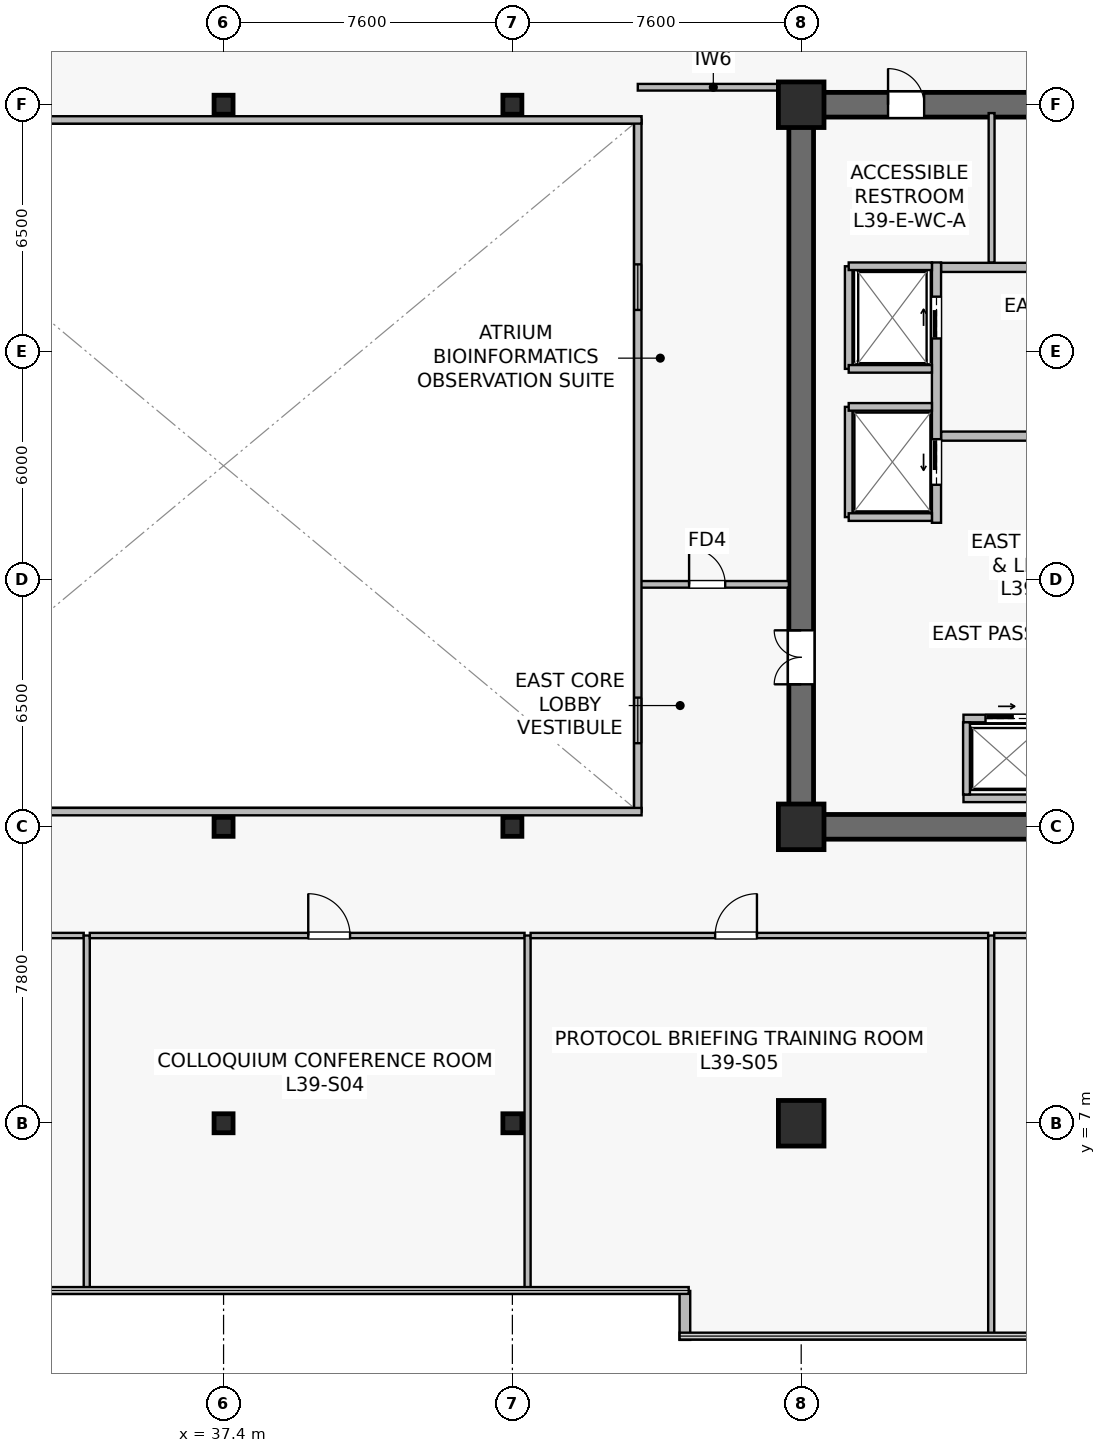
"""IFC4 building model, lengths in metres.
Left out: names, types, materials, properties, quantities, classifications, styles, units other than length and angle.
Written with IfcOpenShell. Run it as: python <this file> out.ifc"""

import sys

from ifc_helpers import new_model, si_unit, direction, frame, frame_2d, origin, origin_2d, place, context, subcontext, project, spatial, rectangle, hollow_rectangle, extrude, source, transform, mapped, element, fill, save


model = new_model("IFC4")
c1 = context("Model", 3, precision=1e-05, world=origin(), true_north=direction((0.0, 1.0)))
c2 = subcontext(c1, "Body", "Model", "MODEL_VIEW")
j1 = project(units=[si_unit("LENGTHUNIT", "METRE"), si_unit("PLANEANGLEUNIT", "RADIAN")], contexts=[c1])
p1 = place(None, origin())
s1 = spatial("IfcSite", under=j1, at=p1, CompositionType="ELEMENT")
p2 = place(p1, origin())
s2 = spatial("IfcBuilding", under=s1, at=p2, CompositionType="ELEMENT")
p3 = place(p2, frame((0.0, 0.0, 162.5)))
s3 = spatial("IfcBuildingStorey", under=s2, at=p3, CompositionType="ELEMENT", Elevation=162.5)
p4 = place(p3, frame((52.275, 14.8, 0.0), z_axis=(0.0, 0.0, 1.0), x_axis=(1.0, 0.0, 0.0)))
e1 = element("IfcWall", 1, at=p4, inside=s3, PredefinedType="SHEAR", context=c2, shape_type="SweptSolid", body=[
    extrude(rectangle(XDim=15.45, YDim=0.65, at=frame_2d((7.725, 0.0))), origin(), (0.0, 0.0, 1.0), 3.79),
])
p5 = place(p3, frame((52.275, 33.8, 0.0), z_axis=(0.0, 0.0, 1.0), x_axis=(1.0, 0.0, 0.0)))
e2 = element("IfcWall", 2, at=p5, inside=s3, PredefinedType="SHEAR", context=c2, shape_type="SweptSolid", body=[
    extrude(rectangle(XDim=15.45, YDim=0.65, at=frame_2d((7.725, 0.0))), origin(), (0.0, 0.0, 1.0), 3.79),
])
p6 = place(p5, frame((7.675, 0.0, 0.0)))
e3 = element("IfcOpeningElement", 3, at=p6, cuts=e2, PredefinedType="OPENING", context=c2, shape_type="SweptSolid", body=[
    extrude(rectangle(XDim=0.95, YDim=2.15, at=frame_2d((0.475, 1.075))), frame((0.0, 0.335, 0.0), z_axis=(0.0, -1.0, 0.0), x_axis=(1.0, 0.0, 0.0)), (0.0, 0.0, 1.0), 0.67),
])
p7 = place(p5, frame((2.61, 0.0, 0.0)))
e4 = element("IfcOpeningElement", 4, at=p7, cuts=e2, PredefinedType="OPENING", context=c2, shape_type="SweptSolid", body=[
    extrude(rectangle(XDim=0.95, YDim=2.15, at=frame_2d((0.475, 1.075))), frame((0.0, 0.335, 0.0), z_axis=(0.0, -1.0, 0.0), x_axis=(1.0, 0.0, 0.0)), (0.0, 0.0, 1.0), 0.67),
])
p8 = place(p3, frame((52.6, 15.125, 0.0), z_axis=(0.0, 0.0, 1.0), x_axis=(0.0, 1.0, 0.0)))
e5 = element("IfcWall", 5, at=p8, inside=s3, PredefinedType="SHEAR", context=c2, shape_type="SweptSolid", body=[
    extrude(rectangle(XDim=18.35, YDim=0.65, at=frame_2d((9.175, 0.0))), origin(), (0.0, 0.0, 1.0), 3.79),
])
p9 = place(p8, frame((3.425, 0.0, 0.0)))
e6 = element("IfcOpeningElement", 6, at=p9, cuts=e5, PredefinedType="OPENING", context=c2, shape_type="SweptSolid", body=[
    extrude(rectangle(XDim=1.42, YDim=2.2, at=frame_2d((0.71, 1.1))), frame((0.0, 0.335, 0.0), z_axis=(0.0, -1.0, 0.0), x_axis=(1.0, 0.0, 0.0)), (0.0, 0.0, 1.0), 0.67),
])
m1 = source(origin(), c2, "Body", "SweptSolid", [
    extrude(rectangle(XDim=1.2, YDim=1.2, at=origin_2d()), origin(), (0.0, 0.0, 1.0), 4.1),
])
for number, where, z_axis, x_axis in (
    (7, (52.6, 7.0, 0.0), (0.0, 0.0, 1.0), (1.0, 0.0, 0.0)),
    (8, (52.6, 14.8, 0.0), (0.0, 0.0, 1.0), (1.0, 0.0, 0.0)),
    (9, (52.6, 33.8, 0.0), (0.0, 0.0, 1.0), (1.0, 0.0, 0.0)),
):
    element("IfcColumn", number, at=place(p3, frame(where, z_axis=z_axis, x_axis=x_axis)), inside=s3, PredefinedType="COLUMN", context=c2, shape_type="MappedRepresentation", body=[
        mapped(m1, transform((0.0, 0.0, 0.0), scale=1.0)),
    ])
m2 = source(origin(), c2, "Body", "SweptSolid", [
    extrude(hollow_rectangle(XDim=0.5, YDim=0.5, WallThickness=0.022, at=origin_2d()), origin(), (0.0, 0.0, 1.0), 4.1),
])
for number, where, z_axis, x_axis in (
    (10, (37.4, 7.0, 0.0), (0.0, 0.0, 1.0), (1.0, 0.0, 0.0)),
    (11, (37.4, 14.8, 0.0), (0.0, 0.0, 1.0), (1.0, 0.0, 0.0)),
    (12, (37.4, 33.8, 0.0), (0.0, 0.0, 1.0), (1.0, 0.0, 0.0)),
    (13, (45.0, 7.0, 0.0), (0.0, 0.0, 1.0), (1.0, 0.0, 0.0)),
    (14, (45.0, 14.8, 0.0), (0.0, 0.0, 1.0), (1.0, 0.0, 0.0)),
    (15, (45.0, 33.8, 0.0), (0.0, 0.0, 1.0), (1.0, 0.0, 0.0)),
):
    element("IfcColumn", number, at=place(p3, frame(where, z_axis=z_axis, x_axis=x_axis)), inside=s3, PredefinedType="COLUMN", context=c2, shape_type="MappedRepresentation", body=[
        mapped(m2, transform((0.0, 0.0, 0.0), scale=1.0)),
    ])
p10 = place(p3, frame((49.54, 2.588, 0.0), z_axis=(0.0, 0.0, 1.0), x_axis=(0.0, -1.0, 0.0)))
e16 = element("IfcWall", 16, at=p10, inside=s3, PredefinedType="STANDARD", context=c2, shape_type="SweptSolid", body=[
    extrude(rectangle(XDim=1.288, YDim=0.28, at=frame_2d((0.644, 0.0))), origin(), (0.0, 0.0, 1.0), 3.79),
])
p11 = place(p3, frame((56.28, 25.08, 0.0), z_axis=(0.0, 0.0, 1.0), x_axis=(1.0, 0.0, 0.0)))
e17 = element("IfcWall", 17, at=p11, inside=s3, PredefinedType="SOLIDWALL", context=c2, shape_type="SweptSolid", body=[
    extrude(rectangle(XDim=6.92, YDim=0.24, at=frame_2d((3.46, 0.0))), origin(), (0.0, 0.0, 1.0), 3.187),
])
p12 = place(p11, frame((2.6, 0.0, 0.0)))
e18 = element("IfcOpeningElement", 18, at=p12, cuts=e17, PredefinedType="OPENING", context=c2, shape_type="SweptSolid", body=[
    extrude(rectangle(XDim=1.2, YDim=2.16, at=frame_2d((0.6, 1.08))), frame((0.0, 0.13, 0.0), z_axis=(0.0, -1.0, 0.0), x_axis=(1.0, 0.0, 0.0)), (0.0, 0.0, 1.0), 0.26),
])
p13 = place(p3, frame((56.28, 29.52, 0.0), z_axis=(0.0, 0.0, 1.0), x_axis=(1.0, 0.0, 0.0)))
e19 = element("IfcWall", 19, at=p13, inside=s3, PredefinedType="SOLIDWALL", context=c2, shape_type="SweptSolid", body=[
    extrude(rectangle(XDim=6.92, YDim=0.24, at=frame_2d((3.46, 0.0))), origin(), (0.0, 0.0, 1.0), 3.187),
])
p14 = place(p3, frame((56.16, 22.8, 0.0), z_axis=(0.0, 0.0, 1.0), x_axis=(0.0, 1.0, 0.0)))
e20 = element("IfcWall", 20, at=p14, inside=s3, PredefinedType="SOLIDWALL", context=c2, shape_type="SweptSolid", body=[
    extrude(rectangle(XDim=6.85, YDim=0.24, at=frame_2d((3.425, 0.0))), origin(), (0.0, 0.0, 1.0), 2.925),
])
p15 = place(p14, frame((4.85, 0.0, 0.0)))
e21 = element("IfcOpeningElement", 21, at=p15, cuts=e20, PredefinedType="OPENING", context=c2, shape_type="SweptSolid", body=[
    extrude(rectangle(XDim=1.1, YDim=2.22, at=frame_2d((0.55, 1.11))), frame((0.0, 0.13, 0.0), z_axis=(0.0, -1.0, 0.0), x_axis=(1.0, 0.0, 0.0)), (0.0, 0.0, 1.0), 0.26),
])
p16 = place(p14, frame((1.0, 0.0, 0.0)))
e22 = element("IfcOpeningElement", 22, at=p16, cuts=e20, PredefinedType="OPENING", context=c2, shape_type="SweptSolid", body=[
    extrude(rectangle(XDim=1.2, YDim=2.22, at=frame_2d((0.6, 1.11))), frame((0.0, 0.13, 0.0), z_axis=(0.0, -1.0, 0.0), x_axis=(1.0, 0.0, 0.0)), (0.0, 0.0, 1.0), 0.26),
])
p17 = place(p3, frame((56.87, 17.65, 0.0), z_axis=(0.0, 0.0, 1.0), x_axis=(1.0, 0.0, 0.0)))
e23 = element("IfcWall", 23, at=p17, inside=s3, PredefinedType="SOLIDWALL", context=c2, shape_type="SweptSolid", body=[
    extrude(rectangle(XDim=2.26, YDim=0.2, at=frame_2d((1.13, 0.0))), origin(), (0.0, 0.0, 1.0), 3.79),
])
p18 = place(p17, frame((0.58, 0.0, 0.0)))
e24 = element("IfcOpeningElement", 24, at=p18, cuts=e23, PredefinedType="OPENING", context=c2, shape_type="SweptSolid", body=[
    extrude(rectangle(XDim=1.1, YDim=2.22, at=frame_2d((0.55, 1.11))), frame((0.0, 0.11, 0.0), z_axis=(0.0, -1.0, 0.0), x_axis=(1.0, 0.0, 0.0)), (0.0, 0.0, 1.0), 0.22),
])
p19 = place(p3, frame((56.87, 15.55, 0.0), z_axis=(0.0, 0.0, 1.0), x_axis=(1.0, 0.0, 0.0)))
e25 = element("IfcWall", 25, at=p19, inside=s3, PredefinedType="SOLIDWALL", context=c2, shape_type="SweptSolid", body=[
    extrude(rectangle(XDim=2.26, YDim=0.2, at=frame_2d((1.13, 0.0))), origin(), (0.0, 0.0, 1.0), 3.79),
])
p20 = place(p3, frame((56.95, 15.65, 0.0), z_axis=(0.0, 0.0, 1.0), x_axis=(0.0, 1.0, 0.0)))
e26 = element("IfcWall", 26, at=p20, inside=s3, PredefinedType="SOLIDWALL", context=c2, shape_type="SweptSolid", body=[
    extrude(rectangle(XDim=1.9, YDim=0.18, at=frame_2d((0.95, 0.0))), origin(), (0.0, 0.0, 1.0), 3.79),
])
p21 = place(p3, frame((53.85, 26.85, 0.0), z_axis=(0.0, 0.0, 1.0), x_axis=(0.0, 1.0, 0.0)))
e27 = element("IfcWall", 27, at=p21, inside=s3, PredefinedType="SOLIDWALL", context=c2, shape_type="SweptSolid", body=[
    extrude(rectangle(XDim=2.7, YDim=0.2, at=frame_2d((1.35, 0.0))), origin(), (0.0, 0.0, 1.0), 3.79),
])
p22 = place(p3, frame((53.85, 29.55, 0.0), z_axis=(0.0, 0.0, 1.0), x_axis=(1.0, 0.0, 0.0)))
e28 = element("IfcWall", 28, at=p22, inside=s3, PredefinedType="SOLIDWALL", context=c2, shape_type="SweptSolid", body=[
    extrude(rectangle(XDim=2.19, YDim=0.2, at=frame_2d((1.095, 0.0))), origin(), (0.0, 0.0, 1.0), 3.79),
])
p23 = place(p3, frame((53.85, 26.85, 0.0), z_axis=(0.0, 0.0, 1.0), x_axis=(1.0, 0.0, 0.0)))
e29 = element("IfcWall", 29, at=p23, inside=s3, PredefinedType="SOLIDWALL", context=c2, shape_type="SweptSolid", body=[
    extrude(rectangle(XDim=2.19, YDim=0.2, at=frame_2d((1.095, 0.0))), origin(), (0.0, 0.0, 1.0), 3.187),
])
p24 = place(p3, frame((53.85, 22.95, 0.0), z_axis=(0.0, 0.0, 1.0), x_axis=(0.0, 1.0, 0.0)))
e30 = element("IfcWall", 30, at=p24, inside=s3, PredefinedType="SOLIDWALL", context=c2, shape_type="SweptSolid", body=[
    extrude(rectangle(XDim=2.9, YDim=0.2, at=frame_2d((1.45, 0.0))), origin(), (0.0, 0.0, 1.0), 2.925),
])
for number, where, z_axis, x_axis in (
    (31, (53.85, 25.85, 0.0), (0.0, 0.0, 1.0), (1.0, 0.0, 0.0)),
    (32, (53.85, 22.95, 0.0), (0.0, 0.0, 1.0), (1.0, 0.0, 0.0)),
):
    element("IfcWall", number, at=place(p3, frame(where, z_axis=z_axis, x_axis=x_axis)), inside=s3, PredefinedType="SOLIDWALL", context=c2, shape_type="SweptSolid", body=[
        extrude(rectangle(XDim=2.19, YDim=0.2, at=frame_2d((1.095, 0.0))), origin(), (0.0, 0.0, 1.0), 3.79),
    ])
p25 = place(p3, frame((57.61, 29.65, 0.0), z_axis=(0.0, 0.0, 1.0), x_axis=(0.0, 1.0, 0.0)))
e33 = element("IfcWall", 33, at=p25, inside=s3, PredefinedType="PLUMBINGWALL", context=c2, shape_type="SweptSolid", body=[
    extrude(rectangle(XDim=3.93, YDim=0.155, at=frame_2d((1.965, 0.0))), origin(), (0.0, 0.0, 1.0), 3.79),
])
p26 = place(p3, frame((48.3, 34.26, 0.0), z_axis=(0.0, 0.0, 1.0), x_axis=(1.0, 0.0, 0.0)))
e34 = element("IfcWall", 34, at=p26, inside=s3, PredefinedType="PARTITIONING", context=c2, shape_type="SweptSolid", body=[
    extrude(rectangle(XDim=3.975, YDim=0.175, at=frame_2d((1.987, 0.0))), origin(), (0.0, 0.0, 1.0), 3.475),
])
p27 = place(p3, frame((48.3, 21.18, 0.0), z_axis=(0.0, 0.0, 1.0), x_axis=(1.0, 0.0, 0.0)))
e35 = element("IfcWall", 35, at=p27, inside=s3, PredefinedType="PARTITIONING", context=c2, shape_type="SweptSolid", body=[
    extrude(rectangle(XDim=3.975, YDim=0.175, at=frame_2d((1.987, 0.0))), origin(), (0.0, 0.0, 1.0), 3.79),
])
p28 = place(p27, frame((1.35, 0.0, 0.0)))
e36 = element("IfcOpeningElement", 36, at=p28, cuts=e35, PredefinedType="OPENING", context=c2, shape_type="SweptSolid", body=[
    extrude(rectangle(XDim=0.95, YDim=2.15, at=frame_2d((0.475, 1.075))), frame((0.0, 0.098, 0.0), z_axis=(0.0, -1.0, 0.0), x_axis=(1.0, 0.0, 0.0)), (0.0, 0.0, 1.0), 0.195),
])
p29 = place(p3, frame((48.3, 15.2, 0.0), z_axis=(0.0, 0.0, 1.0), x_axis=(0.0, 1.0, 0.0)))
e37 = element("IfcWall", 37, at=p29, inside=s3, PredefinedType="SOLIDWALL", context=c2, shape_type="SweptSolid", body=[
    extrude(rectangle(XDim=18.2, YDim=0.195, at=frame_2d((9.1, 0.0))), origin(), (0.0, 0.0, 1.0), 3.79),
])
p30 = place(p29, frame((1.8, 0.0, 0.9)))
e38 = element("IfcOpeningElement", 38, at=p30, cuts=e37, PredefinedType="OPENING", context=c2, shape_type="SweptSolid", body=[
    extrude(rectangle(XDim=1.2, YDim=1.35, at=frame_2d((0.6, 0.675))), frame((0.0, 0.107, 0.0), z_axis=(0.0, -1.0, 0.0), x_axis=(1.0, 0.0, 0.0)), (0.0, 0.0, 1.0), 0.215),
])
p31 = place(p29, frame((13.2, 0.0, 0.9)))
e39 = element("IfcOpeningElement", 39, at=p31, cuts=e37, PredefinedType="OPENING", context=c2, shape_type="SweptSolid", body=[
    extrude(rectangle(XDim=1.2, YDim=1.35, at=frame_2d((0.6, 0.675))), frame((0.0, 0.107, 0.0), z_axis=(0.0, -1.0, 0.0), x_axis=(1.0, 0.0, 0.0)), (0.0, 0.0, 1.0), 0.215),
])
for number, where, z_axis, x_axis in (
    (40, (26.4, 15.2, 0.0), (0.0, 0.0, 1.0), (1.0, 0.0, 0.0)),
    (41, (26.4, 33.4, 0.0), (0.0, 0.0, 1.0), (1.0, 0.0, 0.0)),
):
    element("IfcWall", number, at=place(p3, frame(where, z_axis=z_axis, x_axis=x_axis)), inside=s3, PredefinedType="SOLIDWALL", context=c2, shape_type="SweptSolid", body=[
        extrude(rectangle(XDim=22.0, YDim=0.195, at=frame_2d((11.0, 0.0))), origin(), (0.0, 0.0, 1.0), 3.79),
    ])
p32 = place(p3, frame((22.88, 11.94, 0.0), z_axis=(0.0, 0.0, 1.0), x_axis=(1.0, 0.0, 0.0)))
e42 = element("IfcWall", 42, at=p32, inside=s3, PredefinedType="PARTITIONING", context=c2, shape_type="SweptSolid", body=[
    extrude(rectangle(XDim=10.84, YDim=0.14, at=frame_2d((5.42, 0.0))), origin(), (0.0, 0.0, 1.0), 3.187),
])
p33 = place(p32, frame((4.328, 0.0, 0.0)))
e43 = element("IfcOpeningElement", 43, at=p33, cuts=e42, PredefinedType="OPENING", context=c2, shape_type="SweptSolid", body=[
    extrude(rectangle(XDim=1.1, YDim=2.18, at=frame_2d((0.55, 1.09))), frame((0.0, 0.08, 0.0), z_axis=(0.0, -1.0, 0.0), x_axis=(1.0, 0.0, 0.0)), (0.0, 0.0, 1.0), 0.16),
])
p34 = place(p3, frame((33.8, 2.61, 0.0), z_axis=(0.0, 0.0, 1.0), x_axis=(0.0, 1.0, 0.0)))
e44 = element("IfcWall", 44, at=p34, inside=s3, PredefinedType="PARTITIONING", context=c2, shape_type="SweptSolid", body=[
    extrude(rectangle(XDim=9.33, YDim=0.16, at=frame_2d((4.665, 0.0))), origin(), (0.0, 0.0, 1.0), 3.075),
])
p35 = place(p3, frame((33.88, 11.94, 0.0), z_axis=(0.0, 0.0, 1.0), x_axis=(1.0, 0.0, 0.0)))
e45 = element("IfcWall", 45, at=p35, inside=s3, PredefinedType="PARTITIONING", context=c2, shape_type="SweptSolid", body=[
    extrude(rectangle(XDim=11.44, YDim=0.14, at=frame_2d((5.72, 0.0))), origin(), (0.0, 0.0, 1.0), 3.187),
])
p36 = place(p35, frame((5.748, 0.0, 0.0)))
e46 = element("IfcOpeningElement", 46, at=p36, cuts=e45, PredefinedType="OPENING", context=c2, shape_type="SweptSolid", body=[
    extrude(rectangle(XDim=1.1, YDim=2.18, at=frame_2d((0.55, 1.09))), frame((0.0, 0.08, 0.0), z_axis=(0.0, -1.0, 0.0), x_axis=(1.0, 0.0, 0.0)), (0.0, 0.0, 1.0), 0.16),
])
p37 = place(p3, frame((45.4, 2.61, 0.0), z_axis=(0.0, 0.0, 1.0), x_axis=(0.0, 1.0, 0.0)))
e47 = element("IfcWall", 47, at=p37, inside=s3, PredefinedType="PARTITIONING", context=c2, shape_type="SweptSolid", body=[
    extrude(rectangle(XDim=9.33, YDim=0.16, at=frame_2d((4.665, 0.0))), origin(), (0.0, 0.0, 1.0), 3.075),
])
p38 = place(p3, frame((45.48, 11.94, 0.0), z_axis=(0.0, 0.0, 1.0), x_axis=(1.0, 0.0, 0.0)))
e48 = element("IfcWall", 48, at=p38, inside=s3, PredefinedType="PARTITIONING", context=c2, shape_type="SweptSolid", body=[
    extrude(rectangle(XDim=12.04, YDim=0.14, at=frame_2d((6.02, 0.0))), origin(), (0.0, 0.0, 1.0), 3.187),
])
p39 = place(p38, frame((4.856, 0.0, 0.0)))
e49 = element("IfcOpeningElement", 49, at=p39, cuts=e48, PredefinedType="OPENING", context=c2, shape_type="SweptSolid", body=[
    extrude(rectangle(XDim=1.1, YDim=2.18, at=frame_2d((0.55, 1.09))), frame((0.0, 0.08, 0.0), z_axis=(0.0, -1.0, 0.0), x_axis=(1.0, 0.0, 0.0)), (0.0, 0.0, 1.0), 0.16),
])
p40 = place(p3, frame((57.6, 1.41, 0.0), z_axis=(0.0, 0.0, 1.0), x_axis=(0.0, 1.0, 0.0)))
e50 = element("IfcWall", 50, at=p40, inside=s3, PredefinedType="PARTITIONING", context=c2, shape_type="SweptSolid", body=[
    extrude(rectangle(XDim=10.53, YDim=0.16, at=frame_2d((5.265, 0.0))), origin(), (0.0, 0.0, 1.0), 3.075),
])
p41 = place(p3, frame((57.68, 11.94, 0.0), z_axis=(0.0, 0.0, 1.0), x_axis=(1.0, 0.0, 0.0)))
e51 = element("IfcWall", 51, at=p41, inside=s3, PredefinedType="PARTITIONING", context=c2, shape_type="SweptSolid", body=[
    extrude(rectangle(XDim=10.14, YDim=0.14, at=frame_2d((5.07, 0.0))), origin(), (0.0, 0.0, 1.0), 3.187),
])
p42 = place(p41, frame((5.021, 0.0, 0.0)))
e52 = element("IfcOpeningElement", 52, at=p42, cuts=e51, PredefinedType="OPENING", context=c2, shape_type="SweptSolid", body=[
    extrude(rectangle(XDim=1.1, YDim=2.18, at=frame_2d((0.55, 1.09))), frame((0.0, 0.08, 0.0), z_axis=(0.0, -1.0, 0.0), x_axis=(1.0, 0.0, 0.0)), (0.0, 0.0, 1.0), 0.16),
])
m3 = source(origin(), c2, "Body", "SweptSolid", [
    extrude(rectangle(XDim=1.2, YDim=1.35, at=frame_2d((0.6, 0.675))), frame((0.0, 0.03, 0.0), z_axis=(0.0, -1.0, 0.0), x_axis=(1.0, 0.0, 0.0)), (0.0, 0.0, 1.0), 0.06),
])
p43 = place(p30, origin())
e53 = element("IfcWindow", 53, at=p43, inside=s3, PartitioningType="SINGLE_PANEL", PredefinedType="WINDOW", context=c2, shape_type="MappedRepresentation", body=[
    mapped(m3, transform((0.0, 0.0, 0.0), scale=1.0)),
])
fill(e38, e53)
p44 = place(p31, origin())
e54 = element("IfcWindow", 54, at=p44, inside=s3, PartitioningType="SINGLE_PANEL", PredefinedType="WINDOW", context=c2, shape_type="MappedRepresentation", body=[
    mapped(m3, transform((0.0, 0.0, 0.0), scale=1.0)),
])
fill(e39, e54)
m4 = source(origin(), c2, "Body", "SweptSolid", [
    extrude(rectangle(XDim=1.1, YDim=2.22, at=frame_2d((0.55, 1.11))), frame((0.0, 0.025, 0.0), z_axis=(0.0, -1.0, 0.0), x_axis=(1.0, 0.0, 0.0)), (0.0, 0.0, 1.0), 0.05),
])
p45 = place(p18, origin())
e55 = element("IfcDoor", 55, at=p45, inside=s3, OperationType="SLIDING_TO_RIGHT", PredefinedType="USERDEFINED", context=c2, shape_type="MappedRepresentation", body=[
    mapped(m4, transform((0.0, 0.0, 0.0), scale=1.0)),
])
fill(e24, e55)
p46 = place(p15, origin())
e56 = element("IfcDoor", 56, at=p46, inside=s3, OperationType="SLIDING_TO_RIGHT", PredefinedType="USERDEFINED", context=c2, shape_type="MappedRepresentation", body=[
    mapped(m4, transform((0.0, 0.0, 0.0), scale=1.0)),
])
fill(e21, e56)
m5 = source(origin(), c2, "Body", "SweptSolid", [
    extrude(rectangle(XDim=1.2, YDim=2.22, at=frame_2d((0.6, 1.11))), frame((0.0, 0.025, 0.0), z_axis=(0.0, -1.0, 0.0), x_axis=(1.0, 0.0, 0.0)), (0.0, 0.0, 1.0), 0.05),
])
p47 = place(p16, origin())
e57 = element("IfcDoor", 57, at=p47, inside=s3, OperationType="SLIDING_TO_LEFT", PredefinedType="USERDEFINED", context=c2, shape_type="MappedRepresentation", body=[
    mapped(m5, transform((0.0, 0.0, 0.0), scale=1.0)),
])
fill(e22, e57)
m6 = source(origin(), c2, "Body", "SweptSolid", [
    extrude(rectangle(XDim=1.42, YDim=2.2, at=frame_2d((0.71, 1.1))), frame((0.0, 0.025, 0.0), z_axis=(0.0, -1.0, 0.0), x_axis=(1.0, 0.0, 0.0)), (0.0, 0.0, 1.0), 0.05),
])
p48 = place(p9, origin())
e58 = element("IfcDoor", 58, at=p48, inside=s3, OperationType="DOUBLE_DOOR_SINGLE_SWING", PredefinedType="DOOR", context=c2, shape_type="MappedRepresentation", body=[
    mapped(m6, transform((0.0, 0.0, 0.0), scale=1.0)),
])
fill(e6, e58)
m7 = source(origin(), c2, "Body", "SweptSolid", [
    extrude(rectangle(XDim=0.95, YDim=2.15, at=frame_2d((0.475, 1.075))), frame((0.0, 0.025, 0.0), z_axis=(0.0, -1.0, 0.0), x_axis=(1.0, 0.0, 0.0)), (0.0, 0.0, 1.0), 0.05),
])
p49 = place(p7, origin())
e59 = element("IfcDoor", 59, at=p49, inside=s3, OperationType="SINGLE_SWING_LEFT", PredefinedType="DOOR", context=c2, shape_type="MappedRepresentation", body=[
    mapped(m7, transform((0.0, 0.0, 0.0), scale=1.0)),
])
fill(e4, e59)
p50 = place(p28, origin())
e60 = element("IfcDoor", 60, at=p50, inside=s3, OperationType="SINGLE_SWING_LEFT", PredefinedType="DOOR", context=c2, shape_type="MappedRepresentation", body=[
    mapped(m7, transform((0.0, 0.0, 0.0), scale=1.0)),
])
fill(e36, e60)
m8 = source(origin(), c2, "Body", "SweptSolid", [
    extrude(rectangle(XDim=1.1, YDim=2.18, at=frame_2d((0.55, 1.09))), frame((0.0, 0.025, 0.0), z_axis=(0.0, -1.0, 0.0), x_axis=(1.0, 0.0, 0.0)), (0.0, 0.0, 1.0), 0.05),
])
p51 = place(p36, origin())
e61 = element("IfcDoor", 61, at=p51, inside=s3, OperationType="SINGLE_SWING_LEFT", PredefinedType="DOOR", context=c2, shape_type="MappedRepresentation", body=[
    mapped(m8, transform((0.0, 0.0, 0.0), scale=1.0)),
])
fill(e46, e61)
p52 = place(p39, origin())
e62 = element("IfcDoor", 62, at=p52, inside=s3, OperationType="SINGLE_SWING_RIGHT", PredefinedType="DOOR", context=c2, shape_type="MappedRepresentation", body=[
    mapped(m8, transform((0.0, 0.0, 0.0), scale=1.0)),
])
fill(e49, e62)
save(model, sys.argv[1])
